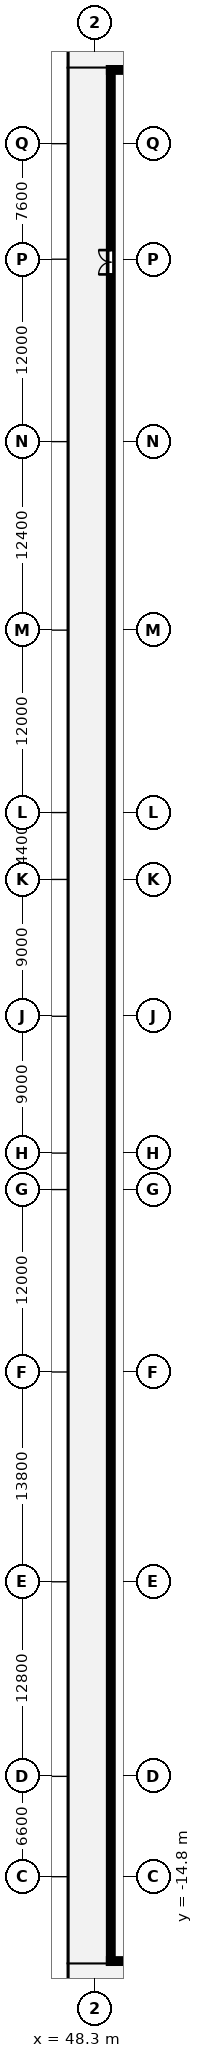
"""IFC4 building model, lengths in metres.
Left out: names, types, materials, properties, quantities, classifications, styles, units other than length and angle.
Written with IfcOpenShell. Run it as: python <this file> out.ifc"""

import sys

from ifc_helpers import new_model, si_unit, direction, frame, frame_2d, origin, place, context, subcontext, project, spatial, rectangle, extrude, element, fill, save


model = new_model("IFC4")
c1 = context("Model", 3, precision=1e-05, world=origin(), true_north=direction((0.0, 1.0)))
c2 = subcontext(c1, "Body", "Model", "MODEL_VIEW")
j1 = project(units=[si_unit("LENGTHUNIT", "METRE"), si_unit("PLANEANGLEUNIT", "RADIAN")], contexts=[c1])
p1 = place(None, origin())
s1 = spatial("IfcSite", under=j1, at=p1, CompositionType="ELEMENT")
p2 = place(p1, origin())
s2 = spatial("IfcBuilding", under=s1, at=p2, CompositionType="ELEMENT")
p3 = place(p2, frame((0.0, 0.0, 10.0)))
s3 = spatial("IfcBuildingStorey", under=s2, at=p3, CompositionType="ELEMENT", Elevation=10.0)
p4 = place(p3, frame((49.2, -20.35, 0.0), z_axis=(0.0, 0.0, 1.0), x_axis=(1.0, 0.0, 0.0)))
e1 = element("IfcWall", 1, at=p4, inside=s3, PredefinedType="STANDARD", context=c2, shape_type="SweptSolid", body=[
    extrude(rectangle(XDim=38.8, YDim=0.3, at=frame_2d((19.4, 0.0))), origin(), (0.0, 0.0, 1.0), 4.2),
])
p5 = place(p4, frame((14.0, 0.0, 0.0)))
e2 = element("IfcOpeningElement", 2, at=p5, cuts=e1, PredefinedType="OPENING", context=c2, shape_type="SweptSolid", body=[
    extrude(rectangle(XDim=1.6, YDim=2.2, at=frame_2d((0.8, 1.1))), frame((0.0, 0.16, 0.0), z_axis=(0.0, -1.0, 0.0), x_axis=(1.0, 0.0, 0.0)), (0.0, 0.0, 1.0), 0.32),
])
p6 = place(p4, frame((24.0, 0.0, 0.9)))
e3 = element("IfcOpeningElement", 3, at=p6, cuts=e1, PredefinedType="OPENING", context=c2, shape_type="SweptSolid", body=[
    extrude(rectangle(XDim=3.0, YDim=2.6, at=frame_2d((1.5, 1.3))), frame((0.0, 0.16, 0.0), z_axis=(0.0, -1.0, 0.0), x_axis=(1.0, 0.0, 0.0)), (0.0, 0.0, 1.0), 0.32),
])
p7 = place(p3, frame((86.0, 104.05, 0.0), z_axis=(0.0, 0.0, 1.0), x_axis=(-1.0, 0.0, 0.0)))
e4 = element("IfcWall", 4, at=p7, inside=s3, PredefinedType="STANDARD", context=c2, shape_type="SweptSolid", body=[
    extrude(rectangle(XDim=36.8, YDim=0.3, at=frame_2d((18.4, 0.0))), origin(), (0.0, 0.0, 1.0), 4.2),
])
p8 = place(p3, frame((49.35, 104.2, 0.0), z_axis=(0.0, 0.0, 1.0), x_axis=(0.0, -1.0, 0.0)))
e5 = element("IfcWall", 5, at=p8, inside=s3, PredefinedType="STANDARD", context=c2, shape_type="SweptSolid", body=[
    extrude(rectangle(XDim=124.7, YDim=0.3, at=frame_2d((62.35, 0.0))), origin(), (0.0, 0.0, 1.0), 4.2),
])
p9 = place(p8, frame((12.0, 0.0, 0.0)))
e6 = element("IfcOpeningElement", 6, at=p9, cuts=e5, PredefinedType="OPENING", context=c2, shape_type="SweptSolid", body=[
    extrude(rectangle(XDim=1.6, YDim=2.2, at=frame_2d((0.8, 1.1))), frame((0.0, 0.16, 0.0), z_axis=(0.0, -1.0, 0.0), x_axis=(1.0, 0.0, 0.0)), (0.0, 0.0, 1.0), 0.32),
])
p10 = place(p9, frame((1.6, 0.0, 0.0), z_axis=(0.0, 0.0, 1.0), x_axis=(-1.0, 0.0, 0.0)))
e7 = element("IfcDoor", 7, at=p10, inside=s3, OperationType="DOUBLE_DOOR_SINGLE_SWING", PredefinedType="DOOR", context=c2, shape_type="SweptSolid", body=[
    extrude(rectangle(XDim=1.6, YDim=2.2, at=frame_2d((0.8, 1.1))), frame((0.0, 0.025, 0.0), z_axis=(0.0, -1.0, 0.0), x_axis=(1.0, 0.0, 0.0)), (0.0, 0.0, 1.0), 0.05),
])
fill(e6, e7)
save(model, sys.argv[1])
